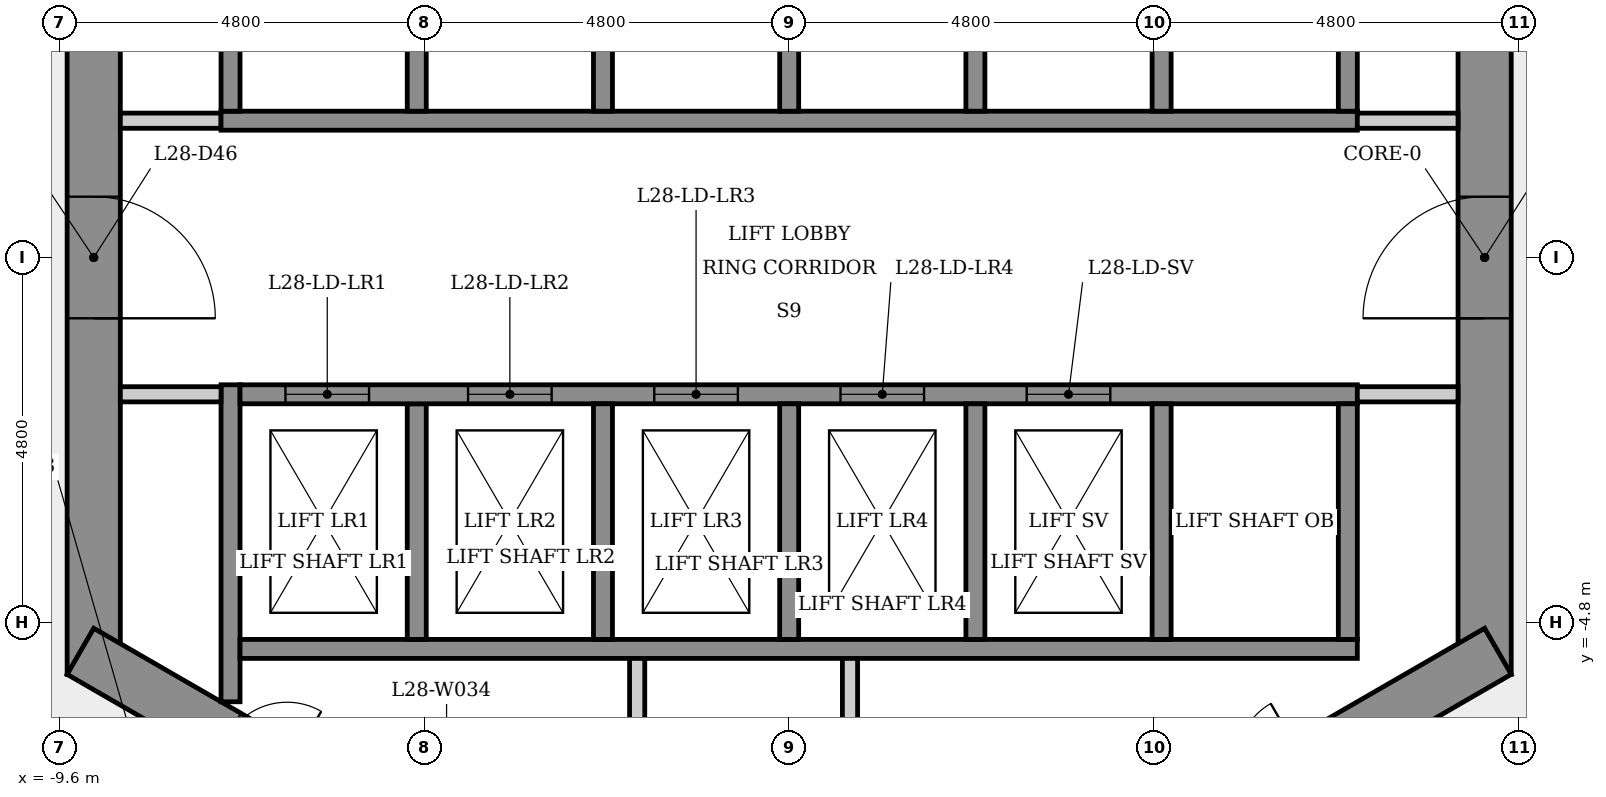
"""IFC4 building model, lengths in metres.
Left out: names, types, materials, properties, quantities, classifications, styles, units other than length and angle.
Written with IfcOpenShell. Run it as: python <this file> out.ifc"""

import sys

from ifc_helpers import new_model, si_unit, direction, frame, frame_2d, origin, place, context, subcontext, project, spatial, rectangle, extrude, element, fill, save


model = new_model("IFC4")
c1 = context("Model", 3, precision=1e-05, world=origin(), true_north=direction((0.0, 1.0)))
c2 = subcontext(c1, "Body", "Model", "MODEL_VIEW")
j1 = project(units=[si_unit("LENGTHUNIT", "METRE"), si_unit("PLANEANGLEUNIT", "RADIAN")], contexts=[c1])
p1 = place(None, origin())
s1 = spatial("IfcSite", under=j1, at=p1, CompositionType="ELEMENT")
p2 = place(p1, origin())
s2 = spatial("IfcBuilding", under=s1, at=p2, CompositionType="ELEMENT")
p3 = place(p2, frame((0.0, 0.0, 106.9)))
s3 = spatial("IfcBuildingStorey", under=s2, at=p3, CompositionType="ELEMENT", Elevation=106.9)
p4 = place(p3, frame((9.15, -5.485, 0.0), z_axis=(0.0, 0.0, 1.0), x_axis=(0.0, 1.0, 0.0)))
e1 = element("IfcWall", 1, at=p4, inside=s3, PredefinedType="SHEAR", context=c2, shape_type="SweptSolid", body=[
    extrude(rectangle(XDim=10.97, YDim=0.7, at=frame_2d((5.485, 0.0))), origin(), (0.0, 0.0, 1.0), 3.4),
])
p5 = place(p4, frame((4.685, 0.0, 0.0)))
e2 = element("IfcOpeningElement", 2, at=p5, cuts=e1, PredefinedType="OPENING", context=c2, shape_type="SweptSolid", body=[
    extrude(rectangle(XDim=1.6, YDim=2.1, at=frame_2d((0.8, 1.05))), frame((0.0, 0.36, 0.0), z_axis=(0.0, -1.0, 0.0), x_axis=(1.0, 0.0, 0.0)), (0.0, 0.0, 1.0), 0.72),
])
p6 = place(p3, frame((-9.15, 5.485, 0.0), z_axis=(0.0, 0.0, 1.0), x_axis=(0.0, -1.0, 0.0)))
e3 = element("IfcWall", 3, at=p6, inside=s3, PredefinedType="SHEAR", context=c2, shape_type="SweptSolid", body=[
    extrude(rectangle(XDim=10.97, YDim=0.7, at=frame_2d((5.485, 0.0))), origin(), (0.0, 0.0, 1.0), 3.4),
])
p7 = place(p6, frame((4.685, 0.0, 0.0)))
e4 = element("IfcOpeningElement", 4, at=p7, cuts=e3, PredefinedType="OPENING", context=c2, shape_type="SweptSolid", body=[
    extrude(rectangle(XDim=1.6, YDim=2.1, at=frame_2d((0.8, 1.05))), frame((0.0, 0.36, 0.0), z_axis=(0.0, -1.0, 0.0), x_axis=(1.0, 0.0, 0.0)), (0.0, 0.0, 1.0), 0.72),
])
p8 = place(p3, frame((-9.325, -5.182, 0.0), z_axis=(0.0, 0.0, 1.0), x_axis=(0.866023993627, -0.500002442456, 0.0)))
e5 = element("IfcWall", 5, at=p8, inside=s3, PredefinedType="SHEAR", context=c2, shape_type="SweptSolid", body=[
    extrude(rectangle(XDim=10.97, YDim=0.7, at=frame_2d((5.485, 0.0))), origin(), (0.0, 0.0, 1.0), 3.4),
])
p9 = place(p8, frame((2.239, 0.0, 0.0)))
e6 = element("IfcOpeningElement", 6, at=p9, cuts=e5, PredefinedType="OPENING", context=c2, shape_type="SweptSolid", body=[
    extrude(rectangle(XDim=0.9, YDim=2.1, at=frame_2d((0.45, 1.05))), frame((0.0, 0.36, 0.0), z_axis=(0.0, -1.0, 0.0), x_axis=(1.0, 0.0, 0.0)), (0.0, 0.0, 1.0), 0.72),
])
p10 = place(p8, frame((8.96, 0.0, 0.0)))
e7 = element("IfcOpeningElement", 7, at=p10, cuts=e5, PredefinedType="OPENING", context=c2, shape_type="SweptSolid", body=[
    extrude(rectangle(XDim=0.9, YDim=2.1, at=frame_2d((0.45, 1.05))), frame((0.0, 0.36, 0.0), z_axis=(0.0, -1.0, 0.0), x_axis=(1.0, 0.0, 0.0)), (0.0, 0.0, 1.0), 0.72),
])
p11 = place(p3, frame((-0.175, -10.667, 0.0), z_axis=(0.0, 0.0, 1.0), x_axis=(0.866023993627, 0.500002442456, 0.0)))
e8 = element("IfcWall", 8, at=p11, inside=s3, PredefinedType="SHEAR", context=c2, shape_type="SweptSolid", body=[
    extrude(rectangle(XDim=10.97, YDim=0.7, at=frame_2d((5.485, 0.0))), origin(), (0.0, 0.0, 1.0), 3.4),
])
p12 = place(p11, frame((7.137, 0.0, 0.0)))
e9 = element("IfcOpeningElement", 9, at=p12, cuts=e8, PredefinedType="OPENING", context=c2, shape_type="SweptSolid", body=[
    extrude(rectangle(XDim=0.9, YDim=2.1, at=frame_2d((0.45, 1.05))), frame((0.0, 0.36, 0.0), z_axis=(0.0, -1.0, 0.0), x_axis=(1.0, 0.0, 0.0)), (0.0, 0.0, 1.0), 0.72),
])
p13 = place(p3, frame((-8.8, 1.8, 0.0), z_axis=(0.0, 0.0, 1.0), x_axis=(1.0, 0.0, 0.0)))
e10 = element("IfcWall", 10, at=p13, inside=s3, PredefinedType="PARTITIONING", context=c2, shape_type="SweptSolid", body=[
    extrude(rectangle(XDim=1.325, YDim=0.2, at=frame_2d((0.663, 0.0))), origin(), (0.0, 0.0, 1.0), 3.05),
])
p14 = place(p3, frame((-7.475, 1.8, 0.0), z_axis=(0.0, 0.0, 1.0), x_axis=(1.0, 0.0, 0.0)))
e11 = element("IfcWall", 11, at=p14, inside=s3, PredefinedType="SHEAR", context=c2, shape_type="SweptSolid", body=[
    extrude(rectangle(XDim=14.95, YDim=0.25, at=frame_2d((7.475, 0.0))), origin(), (0.0, 0.0, 1.0), 3.05),
])
p15 = place(p3, frame((-7.35, -5.846, 0.0), z_axis=(0.0, 0.0, 1.0), x_axis=(0.0, 1.0, 0.0)))
e12 = element("IfcWall", 12, at=p15, inside=s3, PredefinedType="SHEAR", context=c2, shape_type="SweptSolid", body=[
    extrude(rectangle(XDim=4.171, YDim=0.25, at=frame_2d((2.085, 0.0))), origin(), (0.0, 0.0, 1.0), 3.05),
])
p16 = place(p3, frame((-7.35, 1.925, 0.0), z_axis=(0.0, 0.0, 1.0), x_axis=(0.0, 1.0, 0.0)))
e13 = element("IfcWall", 13, at=p16, inside=s3, PredefinedType="SHEAR", context=c2, shape_type="SweptSolid", body=[
    extrude(rectangle(XDim=3.921, YDim=0.25, at=frame_2d((1.96, 0.0))), origin(), (0.0, 0.0, 1.0), 3.05),
])
p17 = place(p3, frame((-7.475, -1.8, 0.0), z_axis=(0.0, 0.0, 1.0), x_axis=(-1.0, 0.0, 0.0)))
e14 = element("IfcWall", 14, at=p17, inside=s3, PredefinedType="PARTITIONING", context=c2, shape_type="SweptSolid", body=[
    extrude(rectangle(XDim=1.325, YDim=0.2, at=frame_2d((0.663, 0.0))), origin(), (0.0, 0.0, 1.0), 3.05),
])
p18 = place(p3, frame((-7.225, -5.15, 0.0), z_axis=(0.0, 0.0, 1.0), x_axis=(1.0, 0.0, 0.0)))
e15 = element("IfcWall", 15, at=p18, inside=s3, PredefinedType="SHEAR", context=c2, shape_type="SweptSolid", body=[
    extrude(rectangle(XDim=14.7, YDim=0.25, at=frame_2d((7.35, 0.0))), origin(), (0.0, 0.0, 1.0), 3.05),
])
for number, where, z_axis, x_axis in (
    (16, (-4.9, -1.925, 0.0), (0.0, 0.0, 1.0), (0.0, -1.0, 0.0)),
    (17, (-4.9, 5.025, 0.0), (0.0, 0.0, 1.0), (0.0, -1.0, 0.0)),
):
    element("IfcWall", number, at=place(p3, frame(where, z_axis=z_axis, x_axis=x_axis)), inside=s3, PredefinedType="SHEAR", context=c2, shape_type="SweptSolid", body=[
        extrude(rectangle(XDim=3.1, YDim=0.25, at=frame_2d((1.55, 0.0))), origin(), (0.0, 0.0, 1.0), 3.4),
    ])
p19 = place(p3, frame((-7.225, -1.8, 0.0), z_axis=(0.0, 0.0, 1.0), x_axis=(1.0, 0.0, 0.0)))
e18 = element("IfcWall", 18, at=p19, inside=s3, PredefinedType="SHEAR", context=c2, shape_type="SweptSolid", body=[
    extrude(rectangle(XDim=14.7, YDim=0.25, at=frame_2d((7.35, 0.0))), origin(), (0.0, 0.0, 1.0), 3.05),
])
p20 = place(p19, frame((0.597, 0.0, 0.0)))
e19 = element("IfcOpeningElement", 19, at=p20, cuts=e18, PredefinedType="OPENING", context=c2, shape_type="SweptSolid", body=[
    extrude(rectangle(XDim=1.1, YDim=2.1, at=frame_2d((0.55, 1.05))), frame((0.0, 0.135, 0.0), z_axis=(0.0, -1.0, 0.0), x_axis=(1.0, 0.0, 0.0)), (0.0, 0.0, 1.0), 0.27),
])
p21 = place(p19, frame((3.0, 0.0, 0.0)))
e20 = element("IfcOpeningElement", 20, at=p21, cuts=e18, PredefinedType="OPENING", context=c2, shape_type="SweptSolid", body=[
    extrude(rectangle(XDim=1.1, YDim=2.1, at=frame_2d((0.55, 1.05))), frame((0.0, 0.135, 0.0), z_axis=(0.0, -1.0, 0.0), x_axis=(1.0, 0.0, 0.0)), (0.0, 0.0, 1.0), 0.27),
])
p22 = place(p19, frame((5.45, 0.0, 0.0)))
e21 = element("IfcOpeningElement", 21, at=p22, cuts=e18, PredefinedType="OPENING", context=c2, shape_type="SweptSolid", body=[
    extrude(rectangle(XDim=1.1, YDim=2.1, at=frame_2d((0.55, 1.05))), frame((0.0, 0.135, 0.0), z_axis=(0.0, -1.0, 0.0), x_axis=(1.0, 0.0, 0.0)), (0.0, 0.0, 1.0), 0.27),
])
p23 = place(p19, frame((7.9, 0.0, 0.0)))
e22 = element("IfcOpeningElement", 22, at=p23, cuts=e18, PredefinedType="OPENING", context=c2, shape_type="SweptSolid", body=[
    extrude(rectangle(XDim=1.1, YDim=2.1, at=frame_2d((0.55, 1.05))), frame((0.0, 0.135, 0.0), z_axis=(0.0, -1.0, 0.0), x_axis=(1.0, 0.0, 0.0)), (0.0, 0.0, 1.0), 0.27),
])
p24 = place(p19, frame((10.35, 0.0, 0.0)))
e23 = element("IfcOpeningElement", 23, at=p24, cuts=e18, PredefinedType="OPENING", context=c2, shape_type="SweptSolid", body=[
    extrude(rectangle(XDim=1.1, YDim=2.1, at=frame_2d((0.55, 1.05))), frame((0.0, 0.135, 0.0), z_axis=(0.0, -1.0, 0.0), x_axis=(1.0, 0.0, 0.0)), (0.0, 0.0, 1.0), 0.27),
])
for number, where, z_axis, x_axis in (
    (24, (-2.45, -1.925, 0.0), (0.0, 0.0, 1.0), (0.0, -1.0, 0.0)),
    (25, (-2.45, 5.025, 0.0), (0.0, 0.0, 1.0), (0.0, -1.0, 0.0)),
):
    element("IfcWall", number, at=place(p3, frame(where, z_axis=z_axis, x_axis=x_axis)), inside=s3, PredefinedType="SHEAR", context=c2, shape_type="SweptSolid", body=[
        extrude(rectangle(XDim=3.1, YDim=0.25, at=frame_2d((1.55, 0.0))), origin(), (0.0, 0.0, 1.0), 3.4),
    ])
p25 = place(p3, frame((-2.0, -5.275, 0.0), z_axis=(0.0, 0.0, 1.0), x_axis=(0.0, -1.0, 0.0)))
e26 = element("IfcWall", 26, at=p25, inside=s3, PredefinedType="PARTITIONING", context=c2, shape_type="SweptSolid", body=[
    extrude(rectangle(XDim=3.732, YDim=0.2, at=frame_2d((1.866, 0.0))), origin(), (0.0, 0.0, 1.0), 3.05),
])
for number, where, z_axis, x_axis in (
    (27, (0.0, -1.925, 0.0), (0.0, 0.0, 1.0), (0.0, -1.0, 0.0)),
    (28, (0.0, 5.025, 0.0), (0.0, 0.0, 1.0), (0.0, -1.0, 0.0)),
):
    element("IfcWall", number, at=place(p3, frame(where, z_axis=z_axis, x_axis=x_axis)), inside=s3, PredefinedType="SHEAR", context=c2, shape_type="SweptSolid", body=[
        extrude(rectangle(XDim=3.1, YDim=0.25, at=frame_2d((1.55, 0.0))), origin(), (0.0, 0.0, 1.0), 3.4),
    ])
p26 = place(p3, frame((0.8, -5.275, 0.0), z_axis=(0.0, 0.0, 1.0), x_axis=(0.0, -1.0, 0.0)))
e29 = element("IfcWall", 29, at=p26, inside=s3, PredefinedType="PARTITIONING", context=c2, shape_type="SweptSolid", body=[
    extrude(rectangle(XDim=4.425, YDim=0.2, at=frame_2d((2.212, 0.0))), origin(), (0.0, 0.0, 1.0), 3.05),
])
for number, where, z_axis, x_axis in (
    (30, (2.45, -1.925, 0.0), (0.0, 0.0, 1.0), (0.0, -1.0, 0.0)),
    (31, (2.45, 5.025, 0.0), (0.0, 0.0, 1.0), (0.0, -1.0, 0.0)),
    (32, (4.9, -1.925, 0.0), (0.0, 0.0, 1.0), (0.0, -1.0, 0.0)),
    (33, (4.9, 5.025, 0.0), (0.0, 0.0, 1.0), (0.0, -1.0, 0.0)),
):
    element("IfcWall", number, at=place(p3, frame(where, z_axis=z_axis, x_axis=x_axis)), inside=s3, PredefinedType="SHEAR", context=c2, shape_type="SweptSolid", body=[
        extrude(rectangle(XDim=3.1, YDim=0.25, at=frame_2d((1.55, 0.0))), origin(), (0.0, 0.0, 1.0), 3.4),
    ])
p27 = place(p3, frame((7.475, 1.8, 0.0), z_axis=(0.0, 0.0, 1.0), x_axis=(1.0, 0.0, 0.0)))
e34 = element("IfcWall", 34, at=p27, inside=s3, PredefinedType="PARTITIONING", context=c2, shape_type="SweptSolid", body=[
    extrude(rectangle(XDim=1.325, YDim=0.2, at=frame_2d((0.663, 0.0))), origin(), (0.0, 0.0, 1.0), 3.05),
])
for number, where, z_axis, x_axis in (
    (35, (7.35, -1.925, 0.0), (0.0, 0.0, 1.0), (0.0, -1.0, 0.0)),
    (36, (7.35, 5.025, 0.0), (0.0, 0.0, 1.0), (0.0, -1.0, 0.0)),
):
    element("IfcWall", number, at=place(p3, frame(where, z_axis=z_axis, x_axis=x_axis)), inside=s3, PredefinedType="SHEAR", context=c2, shape_type="SweptSolid", body=[
        extrude(rectangle(XDim=3.1, YDim=0.25, at=frame_2d((1.55, 0.0))), origin(), (0.0, 0.0, 1.0), 3.4),
    ])
p28 = place(p3, frame((8.8, -1.8, 0.0), z_axis=(0.0, 0.0, 1.0), x_axis=(-1.0, 0.0, 0.0)))
e37 = element("IfcWall", 37, at=p28, inside=s3, PredefinedType="PARTITIONING", context=c2, shape_type="SweptSolid", body=[
    extrude(rectangle(XDim=1.325, YDim=0.2, at=frame_2d((0.663, 0.0))), origin(), (0.0, 0.0, 1.0), 3.05),
])
p29 = place(p20, origin())
e38 = element("IfcDoor", 38, at=p29, inside=s3, OperationType="SLIDING_TO_LEFT", PredefinedType="DOOR", context=c2, shape_type="SweptSolid", body=[
    extrude(rectangle(XDim=1.1, YDim=2.1, at=frame_2d((0.55, 1.05))), frame((0.0, 0.025, 0.0), z_axis=(0.0, -1.0, 0.0), x_axis=(1.0, 0.0, 0.0)), (0.0, 0.0, 1.0), 0.05),
])
fill(e19, e38)
p30 = place(p21, origin())
e39 = element("IfcDoor", 39, at=p30, inside=s3, OperationType="SLIDING_TO_LEFT", PredefinedType="DOOR", context=c2, shape_type="SweptSolid", body=[
    extrude(rectangle(XDim=1.1, YDim=2.1, at=frame_2d((0.55, 1.05))), frame((0.0, 0.025, 0.0), z_axis=(0.0, -1.0, 0.0), x_axis=(1.0, 0.0, 0.0)), (0.0, 0.0, 1.0), 0.05),
])
fill(e20, e39)
p31 = place(p22, origin())
e40 = element("IfcDoor", 40, at=p31, inside=s3, OperationType="SLIDING_TO_LEFT", PredefinedType="DOOR", context=c2, shape_type="SweptSolid", body=[
    extrude(rectangle(XDim=1.1, YDim=2.1, at=frame_2d((0.55, 1.05))), frame((0.0, 0.025, 0.0), z_axis=(0.0, -1.0, 0.0), x_axis=(1.0, 0.0, 0.0)), (0.0, 0.0, 1.0), 0.05),
])
fill(e21, e40)
p32 = place(p23, origin())
e41 = element("IfcDoor", 41, at=p32, inside=s3, OperationType="SLIDING_TO_LEFT", PredefinedType="DOOR", context=c2, shape_type="SweptSolid", body=[
    extrude(rectangle(XDim=1.1, YDim=2.1, at=frame_2d((0.55, 1.05))), frame((0.0, 0.025, 0.0), z_axis=(0.0, -1.0, 0.0), x_axis=(1.0, 0.0, 0.0)), (0.0, 0.0, 1.0), 0.05),
])
fill(e22, e41)
p33 = place(p24, origin())
e42 = element("IfcDoor", 42, at=p33, inside=s3, OperationType="SLIDING_TO_LEFT", PredefinedType="DOOR", context=c2, shape_type="SweptSolid", body=[
    extrude(rectangle(XDim=1.1, YDim=2.1, at=frame_2d((0.55, 1.05))), frame((0.0, 0.025, 0.0), z_axis=(0.0, -1.0, 0.0), x_axis=(1.0, 0.0, 0.0)), (0.0, 0.0, 1.0), 0.05),
])
fill(e23, e42)
p34 = place(p5, origin())
e43 = element("IfcDoor", 43, at=p34, inside=s3, OperationType="SINGLE_SWING_LEFT", PredefinedType="DOOR", context=c2, shape_type="SweptSolid", body=[
    extrude(rectangle(XDim=1.6, YDim=2.1, at=frame_2d((0.8, 1.05))), frame((0.0, 0.025, 0.0), z_axis=(0.0, -1.0, 0.0), x_axis=(1.0, 0.0, 0.0)), (0.0, 0.0, 1.0), 0.05),
])
fill(e2, e43)
p35 = place(p7, origin())
e44 = element("IfcDoor", 44, at=p35, inside=s3, OperationType="SINGLE_SWING_RIGHT", PredefinedType="DOOR", context=c2, shape_type="SweptSolid", body=[
    extrude(rectangle(XDim=1.6, YDim=2.1, at=frame_2d((0.8, 1.05))), frame((0.0, 0.025, 0.0), z_axis=(0.0, -1.0, 0.0), x_axis=(1.0, 0.0, 0.0)), (0.0, 0.0, 1.0), 0.05),
])
fill(e4, e44)
save(model, sys.argv[1])
